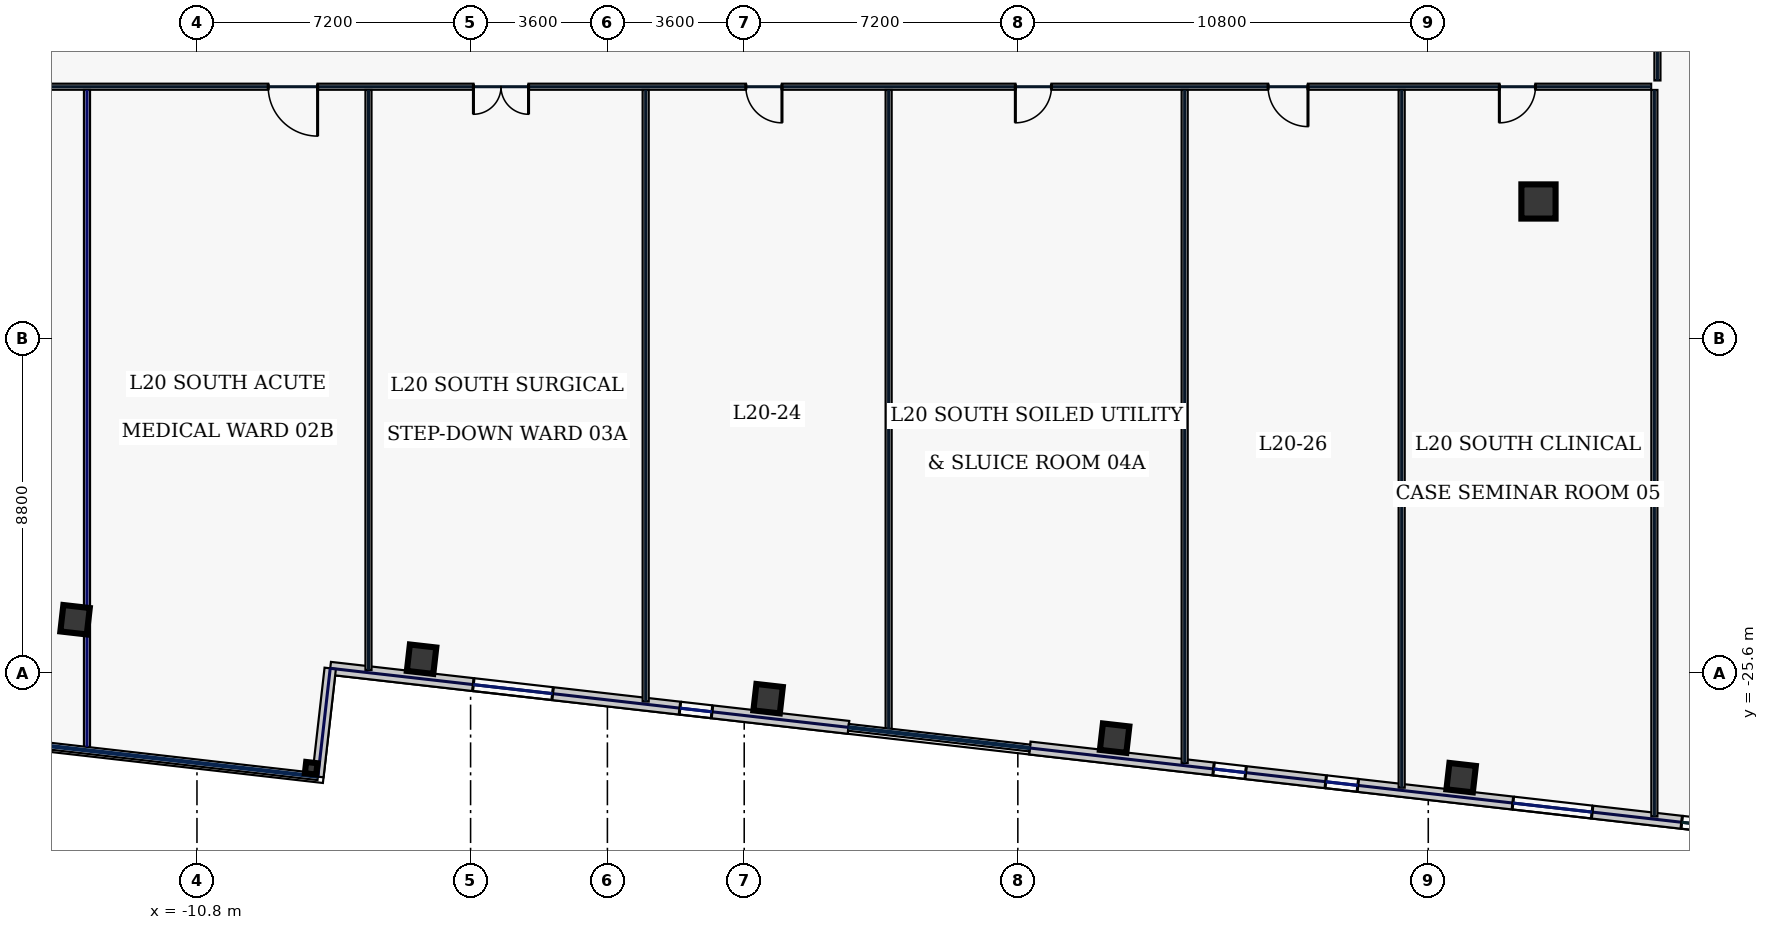
"""IFC4 building model, lengths in metres.
Left out: names, types, materials, properties, quantities, classifications, styles, units other than length and angle.
Written with IfcOpenShell. Run it as: python <this file> out.ifc"""

import sys

from ifc_helpers import new_model, si_unit, direction, frame, frame_2d, origin, origin_2d, place, context, subcontext, project, spatial, rectangle, hollow_rectangle, extrude, element, fill, save


model = new_model("IFC4")
c1 = context("Model", 3, precision=1e-05, world=origin(), true_north=direction((0.0, 1.0)))
c2 = subcontext(c1, "Body", "Model", "MODEL_VIEW")
j1 = project(units=[si_unit("LENGTHUNIT", "METRE"), si_unit("PLANEANGLEUNIT", "RADIAN")], contexts=[c1])
p1 = place(None, origin())
s1 = spatial("IfcSite", under=j1, at=p1, CompositionType="ELEMENT")
p2 = place(p1, origin())
s2 = spatial("IfcBuilding", under=s1, at=p2, CompositionType="ELEMENT")
p3 = place(p2, frame((0.0, 0.0, 93.4)))
s3 = spatial("IfcBuildingStorey", under=s2, at=p3, CompositionType="ELEMENT", Elevation=93.4)
p4 = place(p3, frame((24.5, -13.2, 0.0), z_axis=(0.0, 0.0, 1.0), x_axis=(1.0, 0.0, 0.0)))
e1 = element("IfcColumn", 1, at=p4, inside=s3, PredefinedType="COLUMN", context=c2, shape_type="SweptSolid", body=[
    extrude(hollow_rectangle(XDim=0.9, YDim=0.9, WallThickness=0.04, at=origin_2d()), origin(), (0.0, 0.0, 1.0), 3.74),
])
for number, where, z_axis, x_axis in (
    (2, (-14.008, -24.207, 0.0), (0.0, 0.0, 1.0), (0.994, -0.113, 0.0)),
    (3, (-4.89, -25.246, 0.0), (0.0, 0.0, 1.0), (0.994, -0.113, 0.0)),
    (4, (4.229, -26.284, 0.0), (0.0, 0.0, 1.0), (0.994, -0.113, 0.0)),
    (5, (13.347, -27.323, 0.0), (0.0, 0.0, 1.0), (0.994, -0.113, 0.0)),
    (6, (22.465, -28.362, 0.0), (0.0, 0.0, 1.0), (0.994, -0.113, 0.0)),
):
    element("IfcColumn", number, at=place(p3, frame(where, z_axis=z_axis, x_axis=x_axis)), inside=s3, PredefinedType="COLUMN", context=c2, shape_type="SweptSolid", body=[
        extrude(hollow_rectangle(XDim=0.7, YDim=0.7, WallThickness=0.032, at=origin_2d()), origin(), (0.0, 0.0, 1.0), 3.74),
    ])
p5 = place(p3, frame((-7.794, -28.115, 0.0), z_axis=(0.0, 0.0, 1.0), x_axis=(0.993571855677, -0.113203213768, 0.0)))
e7 = element("IfcColumn", 7, at=p5, inside=s3, PredefinedType="COLUMN", context=c2, shape_type="SweptSolid", body=[
    extrude(hollow_rectangle(XDim=0.3, YDim=0.3, WallThickness=0.016, at=origin_2d()), origin(), (0.0, 0.0, 1.0), 3.74),
])
p6 = place(p3, frame((-7.293, -25.485, 0.0), z_axis=(0.0, 0.0, 1.0), x_axis=(0.993571881197, -0.113202989776, 0.0)))
e8 = element("IfcWall", 8, at=p6, inside=s3, PredefinedType="STANDARD", context=c2, shape_type="SweptSolid", body=[
    extrude(rectangle(XDim=13.727, YDim=0.34, at=frame_2d((6.864, 0.0))), origin(), (0.0, 0.0, 1.0), 3.74),
])
p7 = place(p6, frame((3.789, 0.0, 0.67)))
e9 = element("IfcOpeningElement", 9, at=p7, cuts=e8, PredefinedType="OPENING", context=c2, shape_type="SweptSolid", body=[
    extrude(rectangle(XDim=2.1, YDim=2.2, at=frame_2d((1.05, 1.1))), frame((0.0, 0.18, 0.0), z_axis=(0.0, -1.0, 0.0), x_axis=(1.0, 0.0, 0.0)), (0.0, 0.0, 1.0), 0.36),
])
p8 = place(p6, frame((9.261, 0.0, 0.67)))
e10 = element("IfcOpeningElement", 10, at=p8, cuts=e8, PredefinedType="OPENING", context=c2, shape_type="SweptSolid", body=[
    extrude(rectangle(XDim=0.85, YDim=1.85, at=frame_2d((0.425, 0.925))), frame((0.0, 0.18, 0.0), z_axis=(0.0, -1.0, 0.0), x_axis=(1.0, 0.0, 0.0)), (0.0, 0.0, 1.0), 0.36),
])
p9 = place(p3, frame((11.115, -27.582, 0.0), z_axis=(0.0, 0.0, 1.0), x_axis=(0.993572655904, -0.113196190044, 0.0)))
e11 = element("IfcWall", 11, at=p9, inside=s3, PredefinedType="STANDARD", context=c2, shape_type="SweptSolid", body=[
    extrude(rectangle(XDim=21.223, YDim=0.34, at=frame_2d((10.611, 0.0))), origin(), (0.0, 0.0, 1.0), 3.74),
])
p10 = place(p9, frame((4.866, 0.0, 0.67)))
e12 = element("IfcOpeningElement", 12, at=p10, cuts=e11, PredefinedType="OPENING", context=c2, shape_type="SweptSolid", body=[
    extrude(rectangle(XDim=0.85, YDim=1.85, at=frame_2d((0.425, 0.925))), frame((0.0, 0.18, 0.0), z_axis=(0.0, -1.0, 0.0), x_axis=(1.0, 0.0, 0.0)), (0.0, 0.0, 1.0), 0.36),
])
p11 = place(p9, frame((7.838, 0.0, 0.67)))
e13 = element("IfcOpeningElement", 13, at=p11, cuts=e11, PredefinedType="OPENING", context=c2, shape_type="SweptSolid", body=[
    extrude(rectangle(XDim=0.85, YDim=1.85, at=frame_2d((0.425, 0.925))), frame((0.0, 0.18, 0.0), z_axis=(0.0, -1.0, 0.0), x_axis=(1.0, 0.0, 0.0)), (0.0, 0.0, 1.0), 0.36),
])
p12 = place(p9, frame((12.794, 0.0, 0.67)))
e14 = element("IfcOpeningElement", 14, at=p12, cuts=e11, PredefinedType="OPENING", context=c2, shape_type="SweptSolid", body=[
    extrude(rectangle(XDim=2.1, YDim=2.2, at=frame_2d((1.05, 1.1))), frame((0.0, 0.18, 0.0), z_axis=(0.0, -1.0, 0.0), x_axis=(1.0, 0.0, 0.0)), (0.0, 0.0, 1.0), 0.36),
])
p13 = place(p9, frame((17.265, 0.0, 0.22)))
e15 = element("IfcOpeningElement", 15, at=p13, cuts=e11, PredefinedType="OPENING", context=c2, shape_type="SweptSolid", body=[
    extrude(rectangle(XDim=1.6, YDim=1.2, at=frame_2d((0.8, 0.6))), frame((0.0, 0.18, 0.0), z_axis=(0.0, -1.0, 0.0), x_axis=(1.0, 0.0, 0.0)), (0.0, 0.0, 1.0), 0.36),
])
p14 = place(p3, frame((-7.293, -25.485, 0.0), z_axis=(0.0, 0.0, 1.0), x_axis=(-0.113222704107, -0.993569634839, 0.0)))
e16 = element("IfcWall", 16, at=p14, inside=s3, PredefinedType="STANDARD", context=c2, shape_type="SweptSolid", body=[
    extrude(rectangle(XDim=2.87, YDim=0.3, at=frame_2d((1.435, 0.0))), origin(), (0.0, 0.0, 1.0), 1.535),
])
p15 = place(p3, frame((27.63, 10.115, 0.0), z_axis=(0.0, 0.0, 1.0), x_axis=(0.0, -1.0, 0.0)))
e17 = element("IfcWall", 17, at=p15, inside=s3, PredefinedType="PARTITIONING", context=c2, shape_type="SweptSolid", body=[
    extrude(rectangle(XDim=20.13, YDim=0.16, at=frame_2d((10.065, 0.0))), origin(), (0.0, 0.0, 1.0), 3.74),
])
p16 = place(p15, frame((17.181, 0.0, 0.0)))
e18 = element("IfcOpeningElement", 18, at=p16, cuts=e17, PredefinedType="OPENING", context=c2, shape_type="SweptSolid", body=[
    extrude(rectangle(XDim=0.95, YDim=2.2, at=frame_2d((0.475, 1.1))), frame((0.0, 0.09, 0.0), z_axis=(0.0, -1.0, 0.0), x_axis=(1.0, 0.0, 0.0)), (0.0, 0.0, 1.0), 0.18),
])
p17 = place(p15, frame((12.325, 0.0, 0.0)))
e19 = element("IfcOpeningElement", 19, at=p17, cuts=e17, PredefinedType="OPENING", context=c2, shape_type="SweptSolid", body=[
    extrude(rectangle(XDim=0.95, YDim=2.2, at=frame_2d((0.475, 1.1))), frame((0.0, 0.09, 0.0), z_axis=(0.0, -1.0, 0.0), x_axis=(1.0, 0.0, 0.0)), (0.0, 0.0, 1.0), 0.18),
])
p18 = place(p15, frame((7.125, 0.0, 0.0)))
e20 = element("IfcOpeningElement", 20, at=p18, cuts=e17, PredefinedType="OPENING", context=c2, shape_type="SweptSolid", body=[
    extrude(rectangle(XDim=0.95, YDim=2.2, at=frame_2d((0.475, 1.1))), frame((0.0, 0.09, 0.0), z_axis=(0.0, -1.0, 0.0), x_axis=(1.0, 0.0, 0.0)), (0.0, 0.0, 1.0), 0.18),
])
p19 = place(p15, frame((2.219, 0.0, 0.0)))
e21 = element("IfcOpeningElement", 21, at=p19, cuts=e17, PredefinedType="OPENING", context=c2, shape_type="SweptSolid", body=[
    extrude(rectangle(XDim=0.95, YDim=2.2, at=frame_2d((0.475, 1.1))), frame((0.0, 0.09, 0.0), z_axis=(0.0, -1.0, 0.0), x_axis=(1.0, 0.0, 0.0)), (0.0, 0.0, 1.0), 0.18),
])
p20 = place(p3, frame((27.465, -10.18, 0.0), z_axis=(0.0, 0.0, 1.0), x_axis=(-1.0, 0.0, 0.0)))
e22 = element("IfcWall", 22, at=p20, inside=s3, PredefinedType="PARTITIONING", context=c2, shape_type="SweptSolid", body=[
    extrude(rectangle(XDim=54.93, YDim=0.16, at=frame_2d((27.465, 0.0))), origin(), (0.0, 0.0, 1.0), 3.74),
])
p21 = place(p20, frame((51.656, 0.0, 0.0)))
e23 = element("IfcOpeningElement", 23, at=p21, cuts=e22, PredefinedType="OPENING", context=c2, shape_type="SweptSolid", body=[
    extrude(rectangle(XDim=0.95, YDim=2.2, at=frame_2d((0.475, 1.1))), frame((0.0, 0.09, 0.0), z_axis=(0.0, -1.0, 0.0), x_axis=(1.0, 0.0, 0.0)), (0.0, 0.0, 1.0), 0.18),
])
p22 = place(p20, frame((44.747, 0.0, 0.0)))
e24 = element("IfcOpeningElement", 24, at=p22, cuts=e22, PredefinedType="OPENING", context=c2, shape_type="SweptSolid", body=[
    extrude(rectangle(XDim=1.3, YDim=2.2, at=frame_2d((0.65, 1.1))), frame((0.0, 0.09, 0.0), z_axis=(0.0, -1.0, 0.0), x_axis=(1.0, 0.0, 0.0)), (0.0, 0.0, 1.0), 0.18),
])
p23 = place(p20, frame((35.091, 0.0, 0.0)))
e25 = element("IfcOpeningElement", 25, at=p23, cuts=e22, PredefinedType="OPENING", context=c2, shape_type="SweptSolid", body=[
    extrude(rectangle(XDim=1.3, YDim=2.2, at=frame_2d((0.65, 1.1))), frame((0.0, 0.09, 0.0), z_axis=(0.0, -1.0, 0.0), x_axis=(1.0, 0.0, 0.0)), (0.0, 0.0, 1.0), 0.18),
])
p24 = place(p20, frame((29.54, 0.0, 0.0)))
e26 = element("IfcOpeningElement", 26, at=p24, cuts=e22, PredefinedType="OPENING", context=c2, shape_type="SweptSolid", body=[
    extrude(rectangle(XDim=1.45, YDim=2.2, at=frame_2d((0.725, 1.1))), frame((0.0, 0.09, 0.0), z_axis=(0.0, -1.0, 0.0), x_axis=(1.0, 0.0, 0.0)), (0.0, 0.0, 1.0), 0.18),
])
p25 = place(p20, frame((22.872, 0.0, 0.0)))
e27 = element("IfcOpeningElement", 27, at=p25, cuts=e22, PredefinedType="OPENING", context=c2, shape_type="SweptSolid", body=[
    extrude(rectangle(XDim=0.95, YDim=2.2, at=frame_2d((0.475, 1.1))), frame((0.0, 0.09, 0.0), z_axis=(0.0, -1.0, 0.0), x_axis=(1.0, 0.0, 0.0)), (0.0, 0.0, 1.0), 0.18),
])
p26 = place(p20, frame((15.78, 0.0, 0.0)))
e28 = element("IfcOpeningElement", 28, at=p26, cuts=e22, PredefinedType="OPENING", context=c2, shape_type="SweptSolid", body=[
    extrude(rectangle(XDim=0.95, YDim=2.2, at=frame_2d((0.475, 1.1))), frame((0.0, 0.09, 0.0), z_axis=(0.0, -1.0, 0.0), x_axis=(1.0, 0.0, 0.0)), (0.0, 0.0, 1.0), 0.18),
])
p27 = place(p20, frame((9.03, 0.0, 0.0)))
e29 = element("IfcOpeningElement", 29, at=p27, cuts=e22, PredefinedType="OPENING", context=c2, shape_type="SweptSolid", body=[
    extrude(rectangle(XDim=1.05, YDim=2.2, at=frame_2d((0.525, 1.1))), frame((0.0, 0.09, 0.0), z_axis=(0.0, -1.0, 0.0), x_axis=(1.0, 0.0, 0.0)), (0.0, 0.0, 1.0), 0.18),
])
p28 = place(p20, frame((3.044, 0.0, 0.0)))
e30 = element("IfcOpeningElement", 30, at=p28, cuts=e22, PredefinedType="OPENING", context=c2, shape_type="SweptSolid", body=[
    extrude(rectangle(XDim=0.95, YDim=2.2, at=frame_2d((0.475, 1.1))), frame((0.0, 0.09, 0.0), z_axis=(0.0, -1.0, 0.0), x_axis=(1.0, 0.0, 0.0)), (0.0, 0.0, 1.0), 0.18),
])
p29 = place(p3, frame((27.55, -29.385, 0.0), z_axis=(0.0, 0.0, 1.0), x_axis=(0.0, 1.0, 0.0)))
e31 = element("IfcWall", 31, at=p29, inside=s3, PredefinedType="PARTITIONING", context=c2, shape_type="SweptSolid", body=[
    extrude(rectangle(XDim=19.12, YDim=0.16, at=frame_2d((9.56, 0.0))), origin(), (0.0, 0.0, 1.0), 3.74),
])
p30 = place(p3, frame((-6.287, -25.529, 0.0), z_axis=(0.0, 0.0, 1.0), x_axis=(0.0, 1.0, 0.0)))
e32 = element("IfcWall", 32, at=p30, inside=s3, PredefinedType="PARTITIONING", context=c2, shape_type="SweptSolid", body=[
    extrude(rectangle(XDim=15.264, YDim=0.16, at=frame_2d((7.632, 0.0))), origin(), (0.0, 0.0, 1.0), 3.74),
])
p31 = place(p3, frame((7.4, -27.089, 0.0), z_axis=(0.0, 0.0, 1.0), x_axis=(0.0, 1.0, 0.0)))
e33 = element("IfcWall", 33, at=p31, inside=s3, PredefinedType="PARTITIONING", context=c2, shape_type="SweptSolid", body=[
    extrude(rectangle(XDim=16.824, YDim=0.16, at=frame_2d((8.412, 0.0))), origin(), (0.0, 0.0, 1.0), 3.74),
])
p32 = place(p3, frame((20.9, -28.627, 0.0), z_axis=(0.0, 0.0, 1.0), x_axis=(0.0, 1.0, 0.0)))
e34 = element("IfcWall", 34, at=p32, inside=s3, PredefinedType="PARTITIONING", context=c2, shape_type="SweptSolid", body=[
    extrude(rectangle(XDim=18.362, YDim=0.16, at=frame_2d((9.181, 0.0))), origin(), (0.0, 0.0, 1.0), 3.74),
])
p33 = place(p3, frame((-13.694, -27.554, 0.0), z_axis=(0.0, 0.0, 1.0), x_axis=(0.0, 1.0, 0.0)))
e35 = element("IfcWall", 35, at=p33, inside=s3, PredefinedType="PARTITIONING", context=c2, shape_type="SweptSolid", body=[
    extrude(rectangle(XDim=17.289, YDim=0.16, at=frame_2d((8.645, 0.0))), origin(), (0.0, 0.0, 1.0), 1.535),
])
p34 = place(p3, frame((1.007, -26.36, 0.0), z_axis=(0.0, 0.0, 1.0), x_axis=(0.0, 1.0, 0.0)))
e36 = element("IfcWall", 36, at=p34, inside=s3, PredefinedType="PARTITIONING", context=c2, shape_type="SweptSolid", body=[
    extrude(rectangle(XDim=16.095, YDim=0.16, at=frame_2d((8.048, 0.0))), origin(), (0.0, 0.0, 1.0), 3.74),
])
p35 = place(p3, frame((15.19, -27.976, 0.0), z_axis=(0.0, 0.0, 1.0), x_axis=(0.0, 1.0, 0.0)))
e37 = element("IfcWall", 37, at=p35, inside=s3, PredefinedType="PARTITIONING", context=c2, shape_type="SweptSolid", body=[
    extrude(rectangle(XDim=17.711, YDim=0.16, at=frame_2d((8.855, 0.0))), origin(), (0.0, 0.0, 1.0), 3.74),
])
p36 = place(p7, origin())
e38 = element("IfcWindow", 38, at=p36, inside=s3, PartitioningType="SINGLE_PANEL", PredefinedType="WINDOW", context=c2, shape_type="SweptSolid", body=[
    extrude(rectangle(XDim=2.1, YDim=2.2, at=frame_2d((1.05, 1.1))), frame((0.0, 0.03, 0.0), z_axis=(0.0, -1.0, 0.0), x_axis=(1.0, 0.0, 0.0)), (0.0, 0.0, 1.0), 0.06),
])
fill(e9, e38)
p37 = place(p8, origin())
e39 = element("IfcWindow", 39, at=p37, inside=s3, PartitioningType="SINGLE_PANEL", PredefinedType="WINDOW", context=c2, shape_type="SweptSolid", body=[
    extrude(rectangle(XDim=0.85, YDim=1.85, at=frame_2d((0.425, 0.925))), frame((0.0, 0.03, 0.0), z_axis=(0.0, -1.0, 0.0), x_axis=(1.0, 0.0, 0.0)), (0.0, 0.0, 1.0), 0.06),
])
fill(e10, e39)
p38 = place(p10, origin())
e40 = element("IfcWindow", 40, at=p38, inside=s3, PartitioningType="SINGLE_PANEL", PredefinedType="WINDOW", context=c2, shape_type="SweptSolid", body=[
    extrude(rectangle(XDim=0.85, YDim=1.85, at=frame_2d((0.425, 0.925))), frame((0.0, 0.03, 0.0), z_axis=(0.0, -1.0, 0.0), x_axis=(1.0, 0.0, 0.0)), (0.0, 0.0, 1.0), 0.06),
])
fill(e12, e40)
p39 = place(p11, origin())
e41 = element("IfcWindow", 41, at=p39, inside=s3, PartitioningType="SINGLE_PANEL", PredefinedType="WINDOW", context=c2, shape_type="SweptSolid", body=[
    extrude(rectangle(XDim=0.85, YDim=1.85, at=frame_2d((0.425, 0.925))), frame((0.0, 0.03, 0.0), z_axis=(0.0, -1.0, 0.0), x_axis=(1.0, 0.0, 0.0)), (0.0, 0.0, 1.0), 0.06),
])
fill(e13, e41)
p40 = place(p12, origin())
e42 = element("IfcWindow", 42, at=p40, inside=s3, PartitioningType="SINGLE_PANEL", PredefinedType="WINDOW", context=c2, shape_type="SweptSolid", body=[
    extrude(rectangle(XDim=2.1, YDim=2.2, at=frame_2d((1.05, 1.1))), frame((0.0, 0.03, 0.0), z_axis=(0.0, -1.0, 0.0), x_axis=(1.0, 0.0, 0.0)), (0.0, 0.0, 1.0), 0.06),
])
fill(e14, e42)
p41 = place(p13, origin())
e43 = element("IfcWindow", 43, at=p41, inside=s3, PartitioningType="SINGLE_PANEL", PredefinedType="WINDOW", context=c2, shape_type="SweptSolid", body=[
    extrude(rectangle(XDim=1.6, YDim=1.2, at=frame_2d((0.8, 0.6))), frame((0.0, 0.03, 0.0), z_axis=(0.0, -1.0, 0.0), x_axis=(1.0, 0.0, 0.0)), (0.0, 0.0, 1.0), 0.06),
])
fill(e15, e43)
p42 = place(p23, origin())
e44 = element("IfcDoor", 44, at=p42, inside=s3, OperationType="SINGLE_SWING_LEFT", PredefinedType="DOOR", context=c2, shape_type="SweptSolid", body=[
    extrude(rectangle(XDim=1.3, YDim=2.2, at=frame_2d((0.65, 1.1))), frame((0.0, 0.025, 0.0), z_axis=(0.0, -1.0, 0.0), x_axis=(1.0, 0.0, 0.0)), (0.0, 0.0, 1.0), 0.05),
])
fill(e25, e44)
p43 = place(p24, origin())
e45 = element("IfcDoor", 45, at=p43, inside=s3, OperationType="DOUBLE_SWING_LEFT", PredefinedType="DOOR", context=c2, shape_type="SweptSolid", body=[
    extrude(rectangle(XDim=1.45, YDim=2.2, at=frame_2d((0.725, 1.1))), frame((0.0, 0.025, 0.0), z_axis=(0.0, -1.0, 0.0), x_axis=(1.0, 0.0, 0.0)), (0.0, 0.0, 1.0), 0.05),
])
fill(e26, e45)
p44 = place(p25, origin())
e46 = element("IfcDoor", 46, at=p44, inside=s3, OperationType="SINGLE_SWING_LEFT", PredefinedType="DOOR", context=c2, shape_type="SweptSolid", body=[
    extrude(rectangle(XDim=0.95, YDim=2.2, at=frame_2d((0.475, 1.1))), frame((0.0, 0.025, 0.0), z_axis=(0.0, -1.0, 0.0), x_axis=(1.0, 0.0, 0.0)), (0.0, 0.0, 1.0), 0.05),
])
fill(e27, e46)
p45 = place(p26, origin())
e47 = element("IfcDoor", 47, at=p45, inside=s3, OperationType="SINGLE_SWING_RIGHT", PredefinedType="DOOR", context=c2, shape_type="SweptSolid", body=[
    extrude(rectangle(XDim=0.95, YDim=2.2, at=frame_2d((0.475, 1.1))), frame((0.0, 0.025, 0.0), z_axis=(0.0, -1.0, 0.0), x_axis=(1.0, 0.0, 0.0)), (0.0, 0.0, 1.0), 0.05),
])
fill(e28, e47)
p46 = place(p27, origin())
e48 = element("IfcDoor", 48, at=p46, inside=s3, OperationType="SINGLE_SWING_LEFT", PredefinedType="DOOR", context=c2, shape_type="SweptSolid", body=[
    extrude(rectangle(XDim=1.05, YDim=2.2, at=frame_2d((0.525, 1.1))), frame((0.0, 0.025, 0.0), z_axis=(0.0, -1.0, 0.0), x_axis=(1.0, 0.0, 0.0)), (0.0, 0.0, 1.0), 0.05),
])
fill(e29, e48)
p47 = place(p28, origin())
e49 = element("IfcDoor", 49, at=p47, inside=s3, OperationType="SINGLE_SWING_RIGHT", PredefinedType="DOOR", context=c2, shape_type="SweptSolid", body=[
    extrude(rectangle(XDim=0.95, YDim=2.2, at=frame_2d((0.475, 1.1))), frame((0.0, 0.025, 0.0), z_axis=(0.0, -1.0, 0.0), x_axis=(1.0, 0.0, 0.0)), (0.0, 0.0, 1.0), 0.05),
])
fill(e30, e49)
save(model, sys.argv[1])
